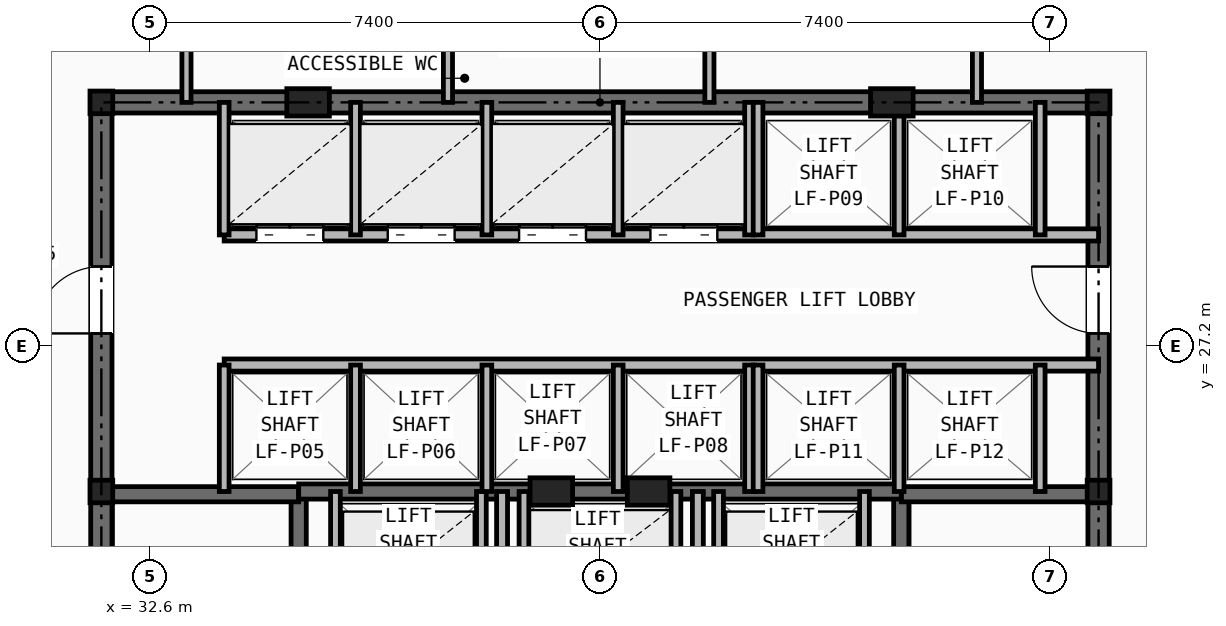
"""IFC4 building model, lengths in metres.
Left out: names, types, materials, properties, quantities, classifications, styles, units other than length and angle.
Written with IfcOpenShell. Run it as: python <this file> out.ifc"""

import sys

from ifc_helpers import new_model, si_unit, direction, frame, frame_2d, origin, origin_2d, place, context, subcontext, project, spatial, rectangle, i_section, extrude, element, fill, save


model = new_model("IFC4")
c1 = context("Model", 3, precision=1e-05, world=origin(), true_north=direction((0.0, 1.0)))
c2 = subcontext(c1, "Body", "Model", "MODEL_VIEW")
j1 = project(units=[si_unit("LENGTHUNIT", "METRE"), si_unit("PLANEANGLEUNIT", "RADIAN")], contexts=[c1])
p1 = place(None, origin())
s1 = spatial("IfcSite", under=j1, at=p1, CompositionType="ELEMENT")
p2 = place(p1, origin())
s2 = spatial("IfcBuilding", under=s1, at=p2, CompositionType="ELEMENT")
p3 = place(p2, frame((0.0, 0.0, 95.8)))
s3 = spatial("IfcBuildingStorey", under=s2, at=p3, CompositionType="ELEMENT", Elevation=95.8)
for number, where, z_axis, x_axis in (
    (1, (31.8, 24.8, 0.0), (0.0, 0.0, 1.0), (1.0, 0.0, 0.0)),
    (2, (48.2, 24.8, 0.0), (0.0, 0.0, 1.0), (1.0, 0.0, 0.0)),
    (3, (31.8, 31.2, 0.0), (0.0, 0.0, 1.0), (1.0, 0.0, 0.0)),
    (4, (48.2, 31.2, 0.0), (0.0, 0.0, 1.0), (1.0, 0.0, 0.0)),
):
    element("IfcColumn", number, at=place(p3, frame(where, z_axis=z_axis, x_axis=x_axis)), inside=s3, PredefinedType="COLUMN", context=c2, shape_type="SweptSolid", body=[
        extrude(i_section(OverallWidth=0.374, OverallDepth=0.372, WebThickness=0.016, FlangeThickness=0.026, at=origin_2d()), origin(), (0.0, 0.0, 1.0), 3.2),
    ])
for number, where, z_axis, x_axis in (
    (5, (35.2, 31.2, 0.0), (0.0, 0.0, 1.0), (1.0, 0.0, 0.0)),
    (6, (44.8, 31.2, 0.0), (0.0, 0.0, 1.0), (1.0, 0.0, 0.0)),
    (7, (39.2, 24.8, 0.0), (0.0, 0.0, 1.0), (1.0, 0.0, 0.0)),
    (8, (40.8, 24.8, 0.0), (0.0, 0.0, 1.0), (1.0, 0.0, 0.0)),
):
    element("IfcColumn", number, at=place(p3, frame(where, z_axis=z_axis, x_axis=x_axis)), inside=s3, PredefinedType="PILASTER", context=c2, shape_type="SweptSolid", body=[
        extrude(rectangle(XDim=0.7, YDim=0.45, at=origin_2d()), origin(), (0.0, 0.0, 1.0), 3.2),
    ])
p4 = place(p3, frame((31.8, 31.2, 0.0), z_axis=(0.0, 0.0, 1.0), x_axis=(1.0, 0.0, 0.0)))
e9 = element("IfcWall", 9, at=p4, inside=s3, PredefinedType="SHEAR", context=c2, shape_type="SweptSolid", body=[
    extrude(rectangle(XDim=16.4, YDim=0.35, at=frame_2d((8.2, 0.0))), origin(), (0.0, 0.0, 1.0), 2.97),
])
p5 = place(p3, frame((31.8, 16.4, 0.0), z_axis=(0.0, 0.0, 1.0), x_axis=(0.0, 1.0, 0.0)))
e10 = element("IfcWall", 10, at=p5, inside=s3, PredefinedType="SHEAR", context=c2, shape_type="SweptSolid", body=[
    extrude(rectangle(XDim=14.8, YDim=0.35, at=frame_2d((7.4, 0.0))), origin(), (0.0, 0.0, 1.0), 2.97),
])
p6 = place(p5, frame((11.0, 0.0, 0.0)))
e11 = element("IfcOpeningElement", 11, at=p6, cuts=e10, PredefinedType="OPENING", context=c2, shape_type="SweptSolid", body=[
    extrude(rectangle(XDim=1.1, YDim=2.15, at=frame_2d((0.55, 1.075))), frame((0.0, 0.185, 0.0), z_axis=(0.0, -1.0, 0.0), x_axis=(1.0, 0.0, 0.0)), (0.0, 0.0, 1.0), 0.37),
])
p7 = place(p3, frame((48.2, 16.4, 0.0), z_axis=(0.0, 0.0, 1.0), x_axis=(0.0, 1.0, 0.0)))
e12 = element("IfcWall", 12, at=p7, inside=s3, PredefinedType="SHEAR", context=c2, shape_type="SweptSolid", body=[
    extrude(rectangle(XDim=14.8, YDim=0.35, at=frame_2d((7.4, 0.0))), origin(), (0.0, 0.0, 1.0), 2.97),
])
p8 = place(p7, frame((11.0, 0.0, 0.0)))
e13 = element("IfcOpeningElement", 13, at=p8, cuts=e12, PredefinedType="OPENING", context=c2, shape_type="SweptSolid", body=[
    extrude(rectangle(XDim=1.1, YDim=2.15, at=frame_2d((0.55, 1.075))), frame((0.0, 0.185, 0.0), z_axis=(0.0, -1.0, 0.0), x_axis=(1.0, 0.0, 0.0)), (0.0, 0.0, 1.0), 0.37),
])
p9 = place(p3, frame((35.045, 16.4, 0.0), z_axis=(0.0, 0.0, 1.0), x_axis=(0.0, 1.0, 0.0)))
e14 = element("IfcWall", 14, at=p9, inside=s3, PredefinedType="SHEAR", context=c2, shape_type="SweptSolid", body=[
    extrude(rectangle(XDim=8.4, YDim=0.25, at=frame_2d((4.2, 0.0))), origin(), (0.0, 0.0, 1.0), 2.97),
])
p10 = place(p9, frame((0.45, 0.0, 0.0)))
e15 = element("IfcOpeningElement", 15, at=p10, cuts=e14, PredefinedType="OPENING", context=c2, shape_type="SweptSolid", body=[
    extrude(rectangle(XDim=0.95, YDim=2.1, at=frame_2d((0.475, 1.05))), frame((0.0, 0.135, 0.0), z_axis=(0.0, -1.0, 0.0), x_axis=(1.0, 0.0, 0.0)), (0.0, 0.0, 1.0), 0.27),
])
p11 = place(p3, frame((31.8, 24.755, 0.0), z_axis=(0.0, 0.0, 1.0), x_axis=(1.0, 0.0, 0.0)))
e16 = element("IfcWall", 16, at=p11, inside=s3, PredefinedType="SHEAR", context=c2, shape_type="SweptSolid", body=[
    extrude(rectangle(XDim=3.245, YDim=0.25, at=frame_2d((1.623, 0.0))), origin(), (0.0, 0.0, 1.0), 2.97),
])
p12 = place(p3, frame((44.955, 16.4, 0.0), z_axis=(0.0, 0.0, 1.0), x_axis=(0.0, 1.0, 0.0)))
e17 = element("IfcWall", 17, at=p12, inside=s3, PredefinedType="SHEAR", context=c2, shape_type="SweptSolid", body=[
    extrude(rectangle(XDim=8.4, YDim=0.25, at=frame_2d((4.2, 0.0))), origin(), (0.0, 0.0, 1.0), 2.97),
])
p13 = place(p12, frame((0.45, 0.0, 0.0)))
e18 = element("IfcOpeningElement", 18, at=p13, cuts=e17, PredefinedType="OPENING", context=c2, shape_type="SweptSolid", body=[
    extrude(rectangle(XDim=0.95, YDim=2.1, at=frame_2d((0.475, 1.05))), frame((0.0, 0.135, 0.0), z_axis=(0.0, -1.0, 0.0), x_axis=(1.0, 0.0, 0.0)), (0.0, 0.0, 1.0), 0.27),
])
p14 = place(p3, frame((44.955, 24.755, 0.0), z_axis=(0.0, 0.0, 1.0), x_axis=(1.0, 0.0, 0.0)))
e19 = element("IfcWall", 19, at=p14, inside=s3, PredefinedType="SHEAR", context=c2, shape_type="SweptSolid", body=[
    extrude(rectangle(XDim=3.245, YDim=0.25, at=frame_2d((1.623, 0.0))), origin(), (0.0, 0.0, 1.0), 2.97),
])
p15 = place(p3, frame((35.045, 24.8, 0.0), z_axis=(0.0, 0.0, 1.0), x_axis=(1.0, 0.0, 0.0)))
e20 = element("IfcWall", 20, at=p15, inside=s3, PredefinedType="SHEAR", context=c2, shape_type="SweptSolid", body=[
    extrude(rectangle(XDim=9.91, YDim=0.25, at=frame_2d((4.955, 0.0))), origin(), (0.0, 0.0, 1.0), 2.97),
])
p16 = place(p3, frame((38.39, 16.4, 0.0), z_axis=(0.0, 0.0, 1.0), x_axis=(0.0, 1.0, 0.0)))
e21 = element("IfcWall", 21, at=p16, inside=s3, PredefinedType="PARTITIONING", context=c2, shape_type="SweptSolid", body=[
    extrude(rectangle(XDim=8.4, YDim=0.18, at=frame_2d((4.2, 0.0))), origin(), (0.0, 0.0, 1.0), 2.421),
])
p17 = place(p16, frame((1.8, 0.0, 0.0)))
e22 = element("IfcOpeningElement", 22, at=p17, cuts=e21, PredefinedType="OPENING", context=c2, shape_type="SweptSolid", body=[
    extrude(rectangle(XDim=0.85, YDim=2.05, at=frame_2d((0.425, 1.025))), frame((0.0, 0.1, 0.0), z_axis=(0.0, -1.0, 0.0), x_axis=(1.0, 0.0, 0.0)), (0.0, 0.0, 1.0), 0.2),
])
p18 = place(p16, frame((4.35, 0.0, 0.0)))
e23 = element("IfcOpeningElement", 23, at=p18, cuts=e21, PredefinedType="OPENING", context=c2, shape_type="SweptSolid", body=[
    extrude(rectangle(XDim=0.95, YDim=2.1, at=frame_2d((0.475, 1.05))), frame((0.0, 0.1, 0.0), z_axis=(0.0, -1.0, 0.0), x_axis=(1.0, 0.0, 0.0)), (0.0, 0.0, 1.0), 0.2),
])
p19 = place(p3, frame((41.61, 16.4, 0.0), z_axis=(0.0, 0.0, 1.0), x_axis=(0.0, 1.0, 0.0)))
e24 = element("IfcWall", 24, at=p19, inside=s3, PredefinedType="PARTITIONING", context=c2, shape_type="SweptSolid", body=[
    extrude(rectangle(XDim=8.4, YDim=0.18, at=frame_2d((4.2, 0.0))), origin(), (0.0, 0.0, 1.0), 2.421),
])
p20 = place(p19, frame((1.8, 0.0, 0.0)))
e25 = element("IfcOpeningElement", 25, at=p20, cuts=e24, PredefinedType="OPENING", context=c2, shape_type="SweptSolid", body=[
    extrude(rectangle(XDim=0.85, YDim=2.05, at=frame_2d((0.425, 1.025))), frame((0.0, 0.1, 0.0), z_axis=(0.0, -1.0, 0.0), x_axis=(1.0, 0.0, 0.0)), (0.0, 0.0, 1.0), 0.2),
])
for number, where, z_axis, x_axis in (
    (26, (35.65, 22.48, 0.0), (0.0, 0.0, 1.0), (0.0, 1.0, 0.0)),
    (27, (38.05, 22.48, 0.0), (0.0, 0.0, 1.0), (0.0, 1.0, 0.0)),
    (28, (41.95, 22.48, 0.0), (0.0, 0.0, 1.0), (0.0, 1.0, 0.0)),
    (29, (44.35, 22.48, 0.0), (0.0, 0.0, 1.0), (0.0, 1.0, 0.0)),
    (30, (38.75, 22.48, 0.0), (0.0, 0.0, 1.0), (0.0, 1.0, 0.0)),
    (31, (41.25, 22.48, 0.0), (0.0, 0.0, 1.0), (0.0, 1.0, 0.0)),
):
    element("IfcWall", number, at=place(p3, frame(where, z_axis=z_axis, x_axis=x_axis)), inside=s3, PredefinedType="SOLIDWALL", context=c2, shape_type="SweptSolid", body=[
        extrude(rectangle(XDim=2.32, YDim=0.16, at=frame_2d((1.16, 0.0))), origin(), (0.0, 0.0, 1.0), 2.97),
    ])
p21 = place(p3, frame((33.82, 29.02, 0.0), z_axis=(0.0, 0.0, 1.0), x_axis=(1.0, 0.0, 0.0)))
e32 = element("IfcWall", 32, at=p21, inside=s3, PredefinedType="SOLIDWALL", context=c2, shape_type="SweptSolid", body=[
    extrude(rectangle(XDim=14.38, YDim=0.2, at=frame_2d((7.19, 0.0))), origin(), (0.0, 0.0, 1.0), 2.421),
])
p22 = place(p21, frame((0.53, 0.0, 0.0)))
e33 = element("IfcOpeningElement", 33, at=p22, cuts=e32, PredefinedType="OPENING", context=c2, shape_type="SweptSolid", body=[
    extrude(rectangle(XDim=1.1, YDim=2.15, at=frame_2d((0.55, 1.075))), frame((0.0, 0.11, 0.0), z_axis=(0.0, -1.0, 0.0), x_axis=(1.0, 0.0, 0.0)), (0.0, 0.0, 1.0), 0.22),
])
p23 = place(p21, frame((2.69, 0.0, 0.0)))
e34 = element("IfcOpeningElement", 34, at=p23, cuts=e32, PredefinedType="OPENING", context=c2, shape_type="SweptSolid", body=[
    extrude(rectangle(XDim=1.1, YDim=2.15, at=frame_2d((0.55, 1.075))), frame((0.0, 0.11, 0.0), z_axis=(0.0, -1.0, 0.0), x_axis=(1.0, 0.0, 0.0)), (0.0, 0.0, 1.0), 0.22),
])
p24 = place(p21, frame((4.85, 0.0, 0.0)))
e35 = element("IfcOpeningElement", 35, at=p24, cuts=e32, PredefinedType="OPENING", context=c2, shape_type="SweptSolid", body=[
    extrude(rectangle(XDim=1.1, YDim=2.15, at=frame_2d((0.55, 1.075))), frame((0.0, 0.11, 0.0), z_axis=(0.0, -1.0, 0.0), x_axis=(1.0, 0.0, 0.0)), (0.0, 0.0, 1.0), 0.22),
])
p25 = place(p21, frame((7.01, 0.0, 0.0)))
e36 = element("IfcOpeningElement", 36, at=p25, cuts=e32, PredefinedType="OPENING", context=c2, shape_type="SweptSolid", body=[
    extrude(rectangle(XDim=1.1, YDim=2.15, at=frame_2d((0.55, 1.075))), frame((0.0, 0.11, 0.0), z_axis=(0.0, -1.0, 0.0), x_axis=(1.0, 0.0, 0.0)), (0.0, 0.0, 1.0), 0.22),
])
p26 = place(p3, frame((33.82, 26.88, 0.0), z_axis=(0.0, 0.0, 1.0), x_axis=(1.0, 0.0, 0.0)))
e37 = element("IfcWall", 37, at=p26, inside=s3, PredefinedType="SOLIDWALL", context=c2, shape_type="SweptSolid", body=[
    extrude(rectangle(XDim=14.38, YDim=0.2, at=frame_2d((7.19, 0.0))), origin(), (0.0, 0.0, 1.0), 2.421),
])
p27 = place(p3, frame((33.82, 29.02, 0.0), z_axis=(0.0, 0.0, 1.0), x_axis=(0.0, 1.0, 0.0)))
e38 = element("IfcWall", 38, at=p27, inside=s3, PredefinedType="SOLIDWALL", context=c2, shape_type="SweptSolid", body=[
    extrude(rectangle(XDim=2.18, YDim=0.16, at=frame_2d((1.09, 0.0))), origin(), (0.0, 0.0, 1.0), 2.421),
])
p28 = place(p3, frame((33.82, 24.8, 0.0), z_axis=(0.0, 0.0, 1.0), x_axis=(0.0, 1.0, 0.0)))
e39 = element("IfcWall", 39, at=p28, inside=s3, PredefinedType="SOLIDWALL", context=c2, shape_type="SweptSolid", body=[
    extrude(rectangle(XDim=2.08, YDim=0.16, at=frame_2d((1.04, 0.0))), origin(), (0.0, 0.0, 1.0), 2.97),
])
for number, where, z_axis, x_axis in (
    (40, (35.98, 29.02, 0.0), (0.0, 0.0, 1.0), (0.0, 1.0, 0.0)),
    (41, (38.14, 29.02, 0.0), (0.0, 0.0, 1.0), (0.0, 1.0, 0.0)),
    (42, (40.3, 29.02, 0.0), (0.0, 0.0, 1.0), (0.0, 1.0, 0.0)),
    (43, (42.46, 29.02, 0.0), (0.0, 0.0, 1.0), (0.0, 1.0, 0.0)),
):
    element("IfcWall", number, at=place(p3, frame(where, z_axis=z_axis, x_axis=x_axis)), inside=s3, PredefinedType="SOLIDWALL", context=c2, shape_type="SweptSolid", body=[
        extrude(rectangle(XDim=2.18, YDim=0.16, at=frame_2d((1.09, 0.0))), origin(), (0.0, 0.0, 1.0), 2.421),
    ])
for number, where, z_axis, x_axis in (
    (44, (35.98, 24.8, 0.0), (0.0, 0.0, 1.0), (0.0, 1.0, 0.0)),
    (45, (38.14, 24.8, 0.0), (0.0, 0.0, 1.0), (0.0, 1.0, 0.0)),
    (46, (40.3, 24.8, 0.0), (0.0, 0.0, 1.0), (0.0, 1.0, 0.0)),
    (47, (42.46, 24.8, 0.0), (0.0, 0.0, 1.0), (0.0, 1.0, 0.0)),
):
    element("IfcWall", number, at=place(p3, frame(where, z_axis=z_axis, x_axis=x_axis)), inside=s3, PredefinedType="SOLIDWALL", context=c2, shape_type="SweptSolid", body=[
        extrude(rectangle(XDim=2.08, YDim=0.16, at=frame_2d((1.04, 0.0))), origin(), (0.0, 0.0, 1.0), 2.97),
    ])
for number, where, z_axis, x_axis in (
    (48, (42.6, 29.02, 0.0), (0.0, 0.0, 1.0), (0.0, 1.0, 0.0)),
    (49, (44.92, 29.02, 0.0), (0.0, 0.0, 1.0), (0.0, 1.0, 0.0)),
    (50, (47.24, 29.02, 0.0), (0.0, 0.0, 1.0), (0.0, 1.0, 0.0)),
):
    element("IfcWall", number, at=place(p3, frame(where, z_axis=z_axis, x_axis=x_axis)), inside=s3, PredefinedType="SOLIDWALL", context=c2, shape_type="SweptSolid", body=[
        extrude(rectangle(XDim=2.18, YDim=0.16, at=frame_2d((1.09, 0.0))), origin(), (0.0, 0.0, 1.0), 2.421),
    ])
for number, where, z_axis, x_axis in (
    (51, (42.6, 24.8, 0.0), (0.0, 0.0, 1.0), (0.0, 1.0, 0.0)),
    (52, (44.92, 24.8, 0.0), (0.0, 0.0, 1.0), (0.0, 1.0, 0.0)),
    (53, (47.24, 24.8, 0.0), (0.0, 0.0, 1.0), (0.0, 1.0, 0.0)),
):
    element("IfcWall", number, at=place(p3, frame(where, z_axis=z_axis, x_axis=x_axis)), inside=s3, PredefinedType="SOLIDWALL", context=c2, shape_type="SweptSolid", body=[
        extrude(rectangle(XDim=2.08, YDim=0.16, at=frame_2d((1.04, 0.0))), origin(), (0.0, 0.0, 1.0), 2.97),
    ])
for number, where, z_axis, x_axis in (
    (54, (33.2, 31.2, 0.0), (0.0, 0.0, 1.0), (0.0, 1.0, 0.0)),
    (55, (46.2, 31.2, 0.0), (0.0, 0.0, 1.0), (0.0, 1.0, 0.0)),
    (56, (37.5, 31.2, 0.0), (0.0, 0.0, 1.0), (0.0, 1.0, 0.0)),
    (57, (41.8, 31.2, 0.0), (0.0, 0.0, 1.0), (0.0, 1.0, 0.0)),
):
    element("IfcWall", number, at=place(p3, frame(where, z_axis=z_axis, x_axis=x_axis)), inside=s3, PredefinedType="PARTITIONING", context=c2, shape_type="SweptSolid", body=[
        extrude(rectangle(XDim=2.6, YDim=0.15, at=frame_2d((1.3, 0.0))), origin(), (0.0, 0.0, 1.0), 2.421),
    ])
p29 = place(p6, origin())
e58 = element("IfcDoor", 58, at=p29, inside=s3, OperationType="SINGLE_SWING_LEFT", PredefinedType="DOOR", context=c2, shape_type="SweptSolid", body=[
    extrude(rectangle(XDim=1.1, YDim=2.15, at=frame_2d((0.55, 1.075))), frame((0.0, 0.025, 0.0), z_axis=(0.0, -1.0, 0.0), x_axis=(1.0, 0.0, 0.0)), (0.0, 0.0, 1.0), 0.05),
])
fill(e11, e58)
p30 = place(p8, origin())
e59 = element("IfcDoor", 59, at=p30, inside=s3, OperationType="SINGLE_SWING_RIGHT", PredefinedType="DOOR", context=c2, shape_type="SweptSolid", body=[
    extrude(rectangle(XDim=1.1, YDim=2.15, at=frame_2d((0.55, 1.075))), frame((0.0, 0.025, 0.0), z_axis=(0.0, -1.0, 0.0), x_axis=(1.0, 0.0, 0.0)), (0.0, 0.0, 1.0), 0.05),
])
fill(e13, e59)
p31 = place(p22, origin())
e60 = element("IfcDoor", 60, at=p31, inside=s3, OperationType="DOUBLE_DOOR_SLIDING", PredefinedType="DOOR", context=c2, shape_type="SweptSolid", body=[
    extrude(rectangle(XDim=1.1, YDim=2.15, at=frame_2d((0.55, 1.075))), frame((0.0, 0.025, 0.0), z_axis=(0.0, -1.0, 0.0), x_axis=(1.0, 0.0, 0.0)), (0.0, 0.0, 1.0), 0.05),
])
fill(e33, e60)
p32 = place(p23, origin())
e61 = element("IfcDoor", 61, at=p32, inside=s3, OperationType="DOUBLE_DOOR_SLIDING", PredefinedType="DOOR", context=c2, shape_type="SweptSolid", body=[
    extrude(rectangle(XDim=1.1, YDim=2.15, at=frame_2d((0.55, 1.075))), frame((0.0, 0.025, 0.0), z_axis=(0.0, -1.0, 0.0), x_axis=(1.0, 0.0, 0.0)), (0.0, 0.0, 1.0), 0.05),
])
fill(e34, e61)
p33 = place(p24, origin())
e62 = element("IfcDoor", 62, at=p33, inside=s3, OperationType="DOUBLE_DOOR_SLIDING", PredefinedType="DOOR", context=c2, shape_type="SweptSolid", body=[
    extrude(rectangle(XDim=1.1, YDim=2.15, at=frame_2d((0.55, 1.075))), frame((0.0, 0.025, 0.0), z_axis=(0.0, -1.0, 0.0), x_axis=(1.0, 0.0, 0.0)), (0.0, 0.0, 1.0), 0.05),
])
fill(e35, e62)
p34 = place(p25, origin())
e63 = element("IfcDoor", 63, at=p34, inside=s3, OperationType="DOUBLE_DOOR_SLIDING", PredefinedType="DOOR", context=c2, shape_type="SweptSolid", body=[
    extrude(rectangle(XDim=1.1, YDim=2.15, at=frame_2d((0.55, 1.075))), frame((0.0, 0.025, 0.0), z_axis=(0.0, -1.0, 0.0), x_axis=(1.0, 0.0, 0.0)), (0.0, 0.0, 1.0), 0.05),
])
fill(e36, e63)
save(model, sys.argv[1])
